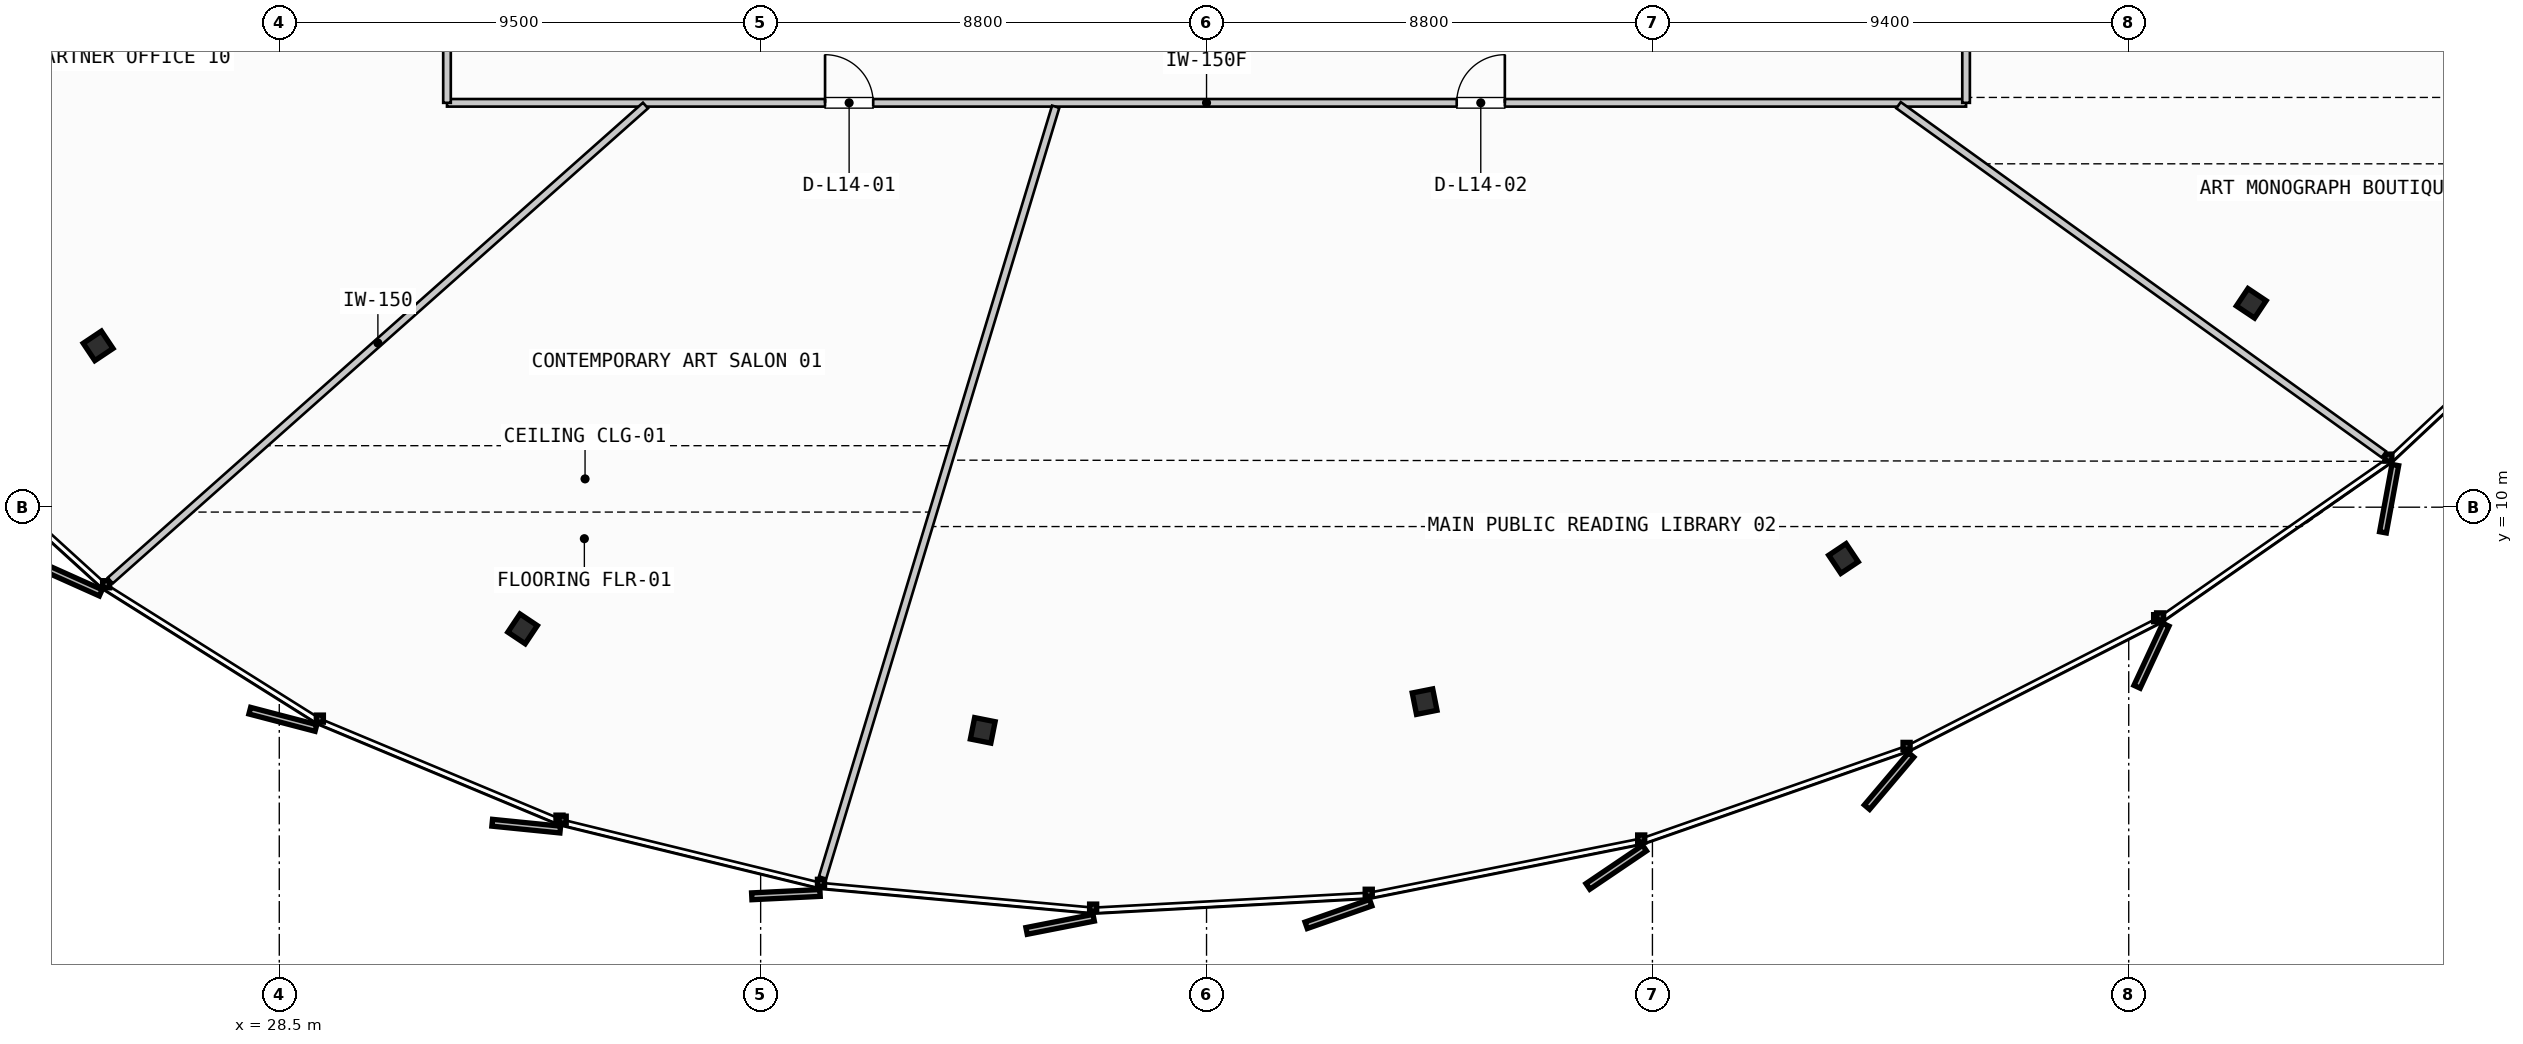
"""IFC4 building model, lengths in metres.
Left out: names, types, materials, properties, quantities, classifications, styles, units other than length and angle.
Written with IfcOpenShell. Run it as: python <this file> out.ifc"""

import sys

from ifc_helpers import new_model, si_unit, direction, frame, frame_2d, origin, origin_2d, place, context, subcontext, project, spatial, rectangle, i_section, extrude, source, transform, mapped, element, fill, save


model = new_model("IFC4")
c1 = context("Model", 3, precision=1e-05, world=origin(), true_north=direction((0.0, 1.0)))
c2 = subcontext(c1, "Body", "Model", "MODEL_VIEW")
j1 = project(units=[si_unit("LENGTHUNIT", "METRE"), si_unit("PLANEANGLEUNIT", "RADIAN")], contexts=[c1])
p1 = place(None, origin())
s1 = spatial("IfcSite", under=j1, at=p1, CompositionType="ELEMENT")
p2 = place(p1, origin())
s2 = spatial("IfcBuilding", under=s1, at=p2, CompositionType="ELEMENT")
p3 = place(p2, frame((0.0, 0.0, 60.0)))
s3 = spatial("IfcBuildingStorey", under=s2, at=p3, CompositionType="ELEMENT", Elevation=60.0)
m1 = source(origin(), c2, "Body", "SweptSolid", [
    extrude(i_section(OverallWidth=0.412, OverallDepth=0.431, WebThickness=0.042, FlangeThickness=0.068, FilletRadius=0.015, at=origin_2d()), origin(), (0.0, 0.0, 1.0), 3.55),
])
for number, where, z_axis, x_axis in (
    (1, (24.925, 13.183, 0.0), (0.0, 0.0, 1.0), (-0.831, -0.556, 0.0)),
    (2, (33.302, 7.599, 0.0), (0.0, 0.0, 1.0), (-0.556, -0.831, 0.0)),
    (3, (42.383, 5.596, 0.0), (0.0, 0.0, 1.0), (-0.195, -0.981, 0.0)),
    (4, (51.104, 6.163, 0.0), (0.0, 0.0, 1.0), (0.195, -0.981, 0.0)),
    (5, (59.37, 8.987, 0.0), (0.0, 0.0, 1.0), (0.556, -0.831, 0.0)),
    (6, (67.418, 14.023, 0.0), (0.0, 0.0, 1.0), (0.831, -0.556, 0.0)),
):
    element("IfcColumn", number, at=place(p3, frame(where, z_axis=z_axis, x_axis=x_axis)), inside=s3, PredefinedType="COLUMN", context=c2, shape_type="MappedRepresentation", body=[
        mapped(m1, transform((0.0, 0.0, 0.0), scale=1.0)),
    ])
p4 = place(p3, frame((31.81, 17.98, 0.0), z_axis=(0.0, 0.0, 1.0), x_axis=(1.0, 0.0, 0.0)))
e7 = element("IfcWall", 7, at=p4, inside=s3, PredefinedType="PARTITIONING", context=c2, shape_type="SweptSolid", body=[
    extrude(rectangle(XDim=29.98, YDim=0.15, at=frame_2d((14.99, 0.0))), origin(), (0.0, 0.0, 1.0), 2.645),
])
p5 = place(p4, frame((7.461, 0.0, 0.0)))
e8 = element("IfcOpeningElement", 8, at=p5, cuts=e7, PredefinedType="OPENING", context=c2, shape_type="SweptSolid", body=[
    extrude(rectangle(XDim=0.95, YDim=2.15, at=frame_2d((0.475, 1.075))), frame((0.0, 0.085, 0.0), z_axis=(0.0, -1.0, 0.0), x_axis=(1.0, 0.0, 0.0)), (0.0, 0.0, 1.0), 0.17),
])
p6 = place(p4, frame((19.927, 0.0, 0.0)))
e9 = element("IfcOpeningElement", 9, at=p6, cuts=e7, PredefinedType="OPENING", context=c2, shape_type="SweptSolid", body=[
    extrude(rectangle(XDim=0.95, YDim=2.15, at=frame_2d((0.475, 1.075))), frame((0.0, 0.085, 0.0), z_axis=(0.0, -1.0, 0.0), x_axis=(1.0, 0.0, 0.0)), (0.0, 0.0, 1.0), 0.17),
])
p7 = place(p3, frame((61.79, 17.98, 0.0), z_axis=(0.0, 0.0, 1.0), x_axis=(0.0, 1.0, 0.0)))
e10 = element("IfcWall", 10, at=p7, inside=s3, PredefinedType="PARTITIONING", context=c2, shape_type="SweptSolid", body=[
    extrude(rectangle(XDim=19.22, YDim=0.15, at=frame_2d((9.61, 0.0))), origin(), (0.0, 0.0, 1.0), 2.645),
])
p8 = place(p7, frame((2.487, 0.0, 0.0)))
e11 = element("IfcOpeningElement", 11, at=p8, cuts=e10, PredefinedType="OPENING", context=c2, shape_type="SweptSolid", body=[
    extrude(rectangle(XDim=0.95, YDim=2.15, at=frame_2d((0.475, 1.075))), frame((0.0, 0.085, 0.0), z_axis=(0.0, -1.0, 0.0), x_axis=(1.0, 0.0, 0.0)), (0.0, 0.0, 1.0), 0.17),
])
p9 = place(p7, frame((9.083, 0.0, 0.0)))
e12 = element("IfcOpeningElement", 12, at=p9, cuts=e10, PredefinedType="OPENING", context=c2, shape_type="SweptSolid", body=[
    extrude(rectangle(XDim=0.95, YDim=2.15, at=frame_2d((0.475, 1.075))), frame((0.0, 0.085, 0.0), z_axis=(0.0, -1.0, 0.0), x_axis=(1.0, 0.0, 0.0)), (0.0, 0.0, 1.0), 0.17),
])
p10 = place(p7, frame((15.732, 0.0, 0.0)))
e13 = element("IfcOpeningElement", 13, at=p10, cuts=e10, PredefinedType="OPENING", context=c2, shape_type="SweptSolid", body=[
    extrude(rectangle(XDim=0.95, YDim=2.15, at=frame_2d((0.475, 1.075))), frame((0.0, 0.085, 0.0), z_axis=(0.0, -1.0, 0.0), x_axis=(1.0, 0.0, 0.0)), (0.0, 0.0, 1.0), 0.17),
])
p11 = place(p3, frame((31.81, 37.2, 0.0), z_axis=(0.0, 0.0, 1.0), x_axis=(0.0, -1.0, 0.0)))
e14 = element("IfcWall", 14, at=p11, inside=s3, PredefinedType="PARTITIONING", context=c2, shape_type="SweptSolid", body=[
    extrude(rectangle(XDim=19.22, YDim=0.15, at=frame_2d((9.61, 0.0))), origin(), (0.0, 0.0, 1.0), 2.645),
])
p12 = place(p11, frame((4.901, 0.0, 0.0)))
e15 = element("IfcOpeningElement", 15, at=p12, cuts=e14, PredefinedType="OPENING", context=c2, shape_type="SweptSolid", body=[
    extrude(rectangle(XDim=0.95, YDim=2.15, at=frame_2d((0.475, 1.075))), frame((0.0, 0.085, 0.0), z_axis=(0.0, -1.0, 0.0), x_axis=(1.0, 0.0, 0.0)), (0.0, 0.0, 1.0), 0.17),
])
p13 = place(p11, frame((13.411, 0.0, 0.0)))
e16 = element("IfcOpeningElement", 16, at=p13, cuts=e14, PredefinedType="OPENING", context=c2, shape_type="SweptSolid", body=[
    extrude(rectangle(XDim=0.95, YDim=2.15, at=frame_2d((0.475, 1.075))), frame((0.0, 0.085, 0.0), z_axis=(0.0, -1.0, 0.0), x_axis=(1.0, 0.0, 0.0)), (0.0, 0.0, 1.0), 0.17),
])
p14 = place(p3, frame((35.727, 17.927, 0.0), z_axis=(0.0, 0.0, 1.0), x_axis=(-0.747915570014, -0.663793868706, 0.0)))
e17 = element("IfcWall", 17, at=p14, inside=s3, PredefinedType="PARTITIONING", context=c2, shape_type="SweptSolid", body=[
    extrude(rectangle(XDim=14.122, YDim=0.15, at=frame_2d((7.061, 0.0))), origin(), (0.0, 0.0, 1.0), 2.645),
])
p15 = place(p3, frame((43.823, 17.903, 0.0), z_axis=(0.0, 0.0, 1.0), x_axis=(-0.289464136663, -0.957188859936, 0.0)))
e18 = element("IfcWall", 18, at=p15, inside=s3, PredefinedType="PARTITIONING", context=c2, shape_type="SweptSolid", body=[
    extrude(rectangle(XDim=15.892, YDim=0.15, at=frame_2d((7.946, 0.0))), origin(), (0.0, 0.0, 1.0), 2.645),
])
p16 = place(p3, frame((60.458, 17.933, 0.0), z_axis=(0.0, 0.0, 1.0), x_axis=(0.811709736276, -0.584061044785, 0.0)))
e19 = element("IfcWall", 19, at=p16, inside=s3, PredefinedType="PARTITIONING", context=c2, shape_type="SweptSolid", body=[
    extrude(rectangle(XDim=11.799, YDim=0.15, at=frame_2d((5.899, 0.0))), origin(), (0.0, 0.0, 1.0), 2.645),
])
p17 = place(p3, frame((61.867, 23.302, 0.0), z_axis=(0.0, 0.0, 1.0), x_axis=(0.958583733274, -0.284810860578, 0.0)))
e20 = element("IfcWall", 20, at=p17, inside=s3, PredefinedType="PARTITIONING", context=c2, shape_type="SweptSolid", body=[
    extrude(rectangle(XDim=15.898, YDim=0.15, at=frame_2d((7.949, 0.0))), origin(), (0.0, 0.0, 1.0), 2.645),
])
m2 = source(origin(), c2, "Body", "SweptSolid", [
    extrude(rectangle(XDim=0.95, YDim=2.15, at=frame_2d((0.475, 1.075))), frame((0.0, 0.025, 0.0), z_axis=(0.0, -1.0, 0.0), x_axis=(1.0, 0.0, 0.0)), (0.0, 0.0, 1.0), 0.05),
])
p18 = place(p5, origin())
e21 = element("IfcDoor", 21, at=p18, inside=s3, OperationType="SINGLE_SWING_LEFT", PredefinedType="DOOR", context=c2, shape_type="MappedRepresentation", body=[
    mapped(m2, transform((0.0, 0.0, 0.0), scale=1.0)),
])
fill(e8, e21)
p19 = place(p6, origin())
e22 = element("IfcDoor", 22, at=p19, inside=s3, OperationType="SINGLE_SWING_RIGHT", PredefinedType="DOOR", context=c2, shape_type="MappedRepresentation", body=[
    mapped(m2, transform((0.0, 0.0, 0.0), scale=1.0)),
])
fill(e9, e22)
save(model, sys.argv[1])
